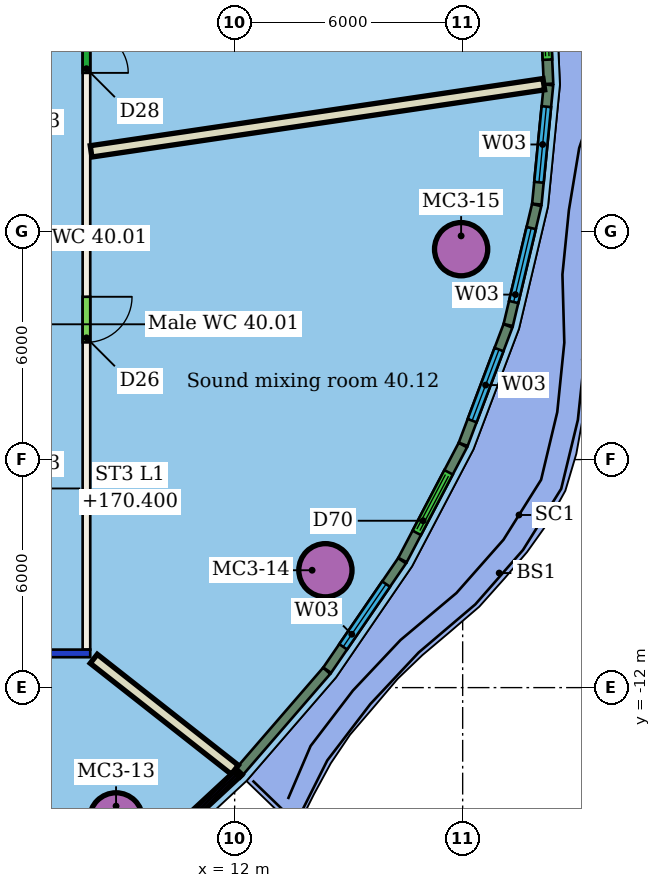
"""IFC4 building model, lengths in metres.
Left out: names, types, materials, properties, quantities, classifications, styles, units other than length and angle.
Written with IfcOpenShell. Run it as: python <this file> out.ifc"""

import sys

from ifc_helpers import new_model, si_unit, direction, frame, frame_2d, origin, origin_2d, place, context, subcontext, project, spatial, rectangle, hollow_circle, extrude, element, fill, save


model = new_model("IFC4")
c1 = context("Model", 3, precision=1e-05, world=origin(), true_north=direction((0.0, 1.0)))
c2 = subcontext(c1, "Body", "Model", "MODEL_VIEW")
j1 = project(units=[si_unit("LENGTHUNIT", "METRE"), si_unit("PLANEANGLEUNIT", "RADIAN")], contexts=[c1])
p1 = place(None, origin())
s1 = spatial("IfcSite", under=j1, at=p1, CompositionType="ELEMENT")
p2 = place(p1, origin())
s2 = spatial("IfcBuilding", under=s1, at=p2, CompositionType="ELEMENT")
p3 = place(p2, frame((0.0, 0.0, 168.6)))
s3 = spatial("IfcBuildingStorey", under=s2, at=p3, CompositionType="ELEMENT", Elevation=168.6)
for number, where, z_axis, x_axis in (
    (1, (8.879, -15.467, 0.0), (0.0, 0.0, 1.0), (1.0, 0.0, 0.0)),
    (2, (14.388, -8.912, 0.0), (0.0, 0.0, 1.0), (1.0, 0.0, 0.0)),
    (3, (17.959, -0.464, 0.0), (0.0, 0.0, 1.0), (1.0, 0.0, 0.0)),
):
    element("IfcColumn", number, at=place(p3, frame(where, z_axis=z_axis, x_axis=x_axis)), inside=s3, PredefinedType="COLUMN", context=c2, shape_type="SweptSolid", body=[
        extrude(hollow_circle(Radius=0.7, WallThickness=0.05, at=origin_2d()), origin(), (0.0, 0.0, 1.0), 3.45),
    ])
p4 = place(p3, frame((8.2, -11.1, 0.0), z_axis=(0.0, 0.0, 1.0), x_axis=(-1.0, 0.0, 0.0)))
e4 = element("IfcWall", 4, at=p4, inside=s3, PredefinedType="PARTITIONING", context=c2, shape_type="SweptSolid", body=[
    extrude(rectangle(XDim=28.4, YDim=0.2, at=frame_2d((14.2, 0.0))), origin(), (0.0, 0.0, 1.0), 3.05),
])
p5 = place(p4, frame((24.377, 0.0, 0.0)))
e5 = element("IfcOpeningElement", 5, at=p5, cuts=e4, PredefinedType="OPENING", context=c2, shape_type="SweptSolid", body=[
    extrude(rectangle(XDim=1.2, YDim=2.1, at=frame_2d((0.6, 1.05))), frame((0.0, 0.11, 0.0), z_axis=(0.0, -1.0, 0.0), x_axis=(1.0, 0.0, 0.0)), (0.0, 0.0, 1.0), 0.22),
])
p6 = place(p4, frame((19.08, 0.0, 0.0)))
e6 = element("IfcOpeningElement", 6, at=p6, cuts=e4, PredefinedType="OPENING", context=c2, shape_type="SweptSolid", body=[
    extrude(rectangle(XDim=1.2, YDim=2.1, at=frame_2d((0.6, 1.05))), frame((0.0, 0.11, 0.0), z_axis=(0.0, -1.0, 0.0), x_axis=(1.0, 0.0, 0.0)), (0.0, 0.0, 1.0), 0.22),
])
p7 = place(p4, frame((14.784, 0.0, 0.0)))
e7 = element("IfcOpeningElement", 7, at=p7, cuts=e4, PredefinedType="OPENING", context=c2, shape_type="SweptSolid", body=[
    extrude(rectangle(XDim=1.8, YDim=2.4, at=frame_2d((0.9, 1.2))), frame((0.0, 0.11, 0.0), z_axis=(0.0, -1.0, 0.0), x_axis=(1.0, 0.0, 0.0)), (0.0, 0.0, 1.0), 0.22),
])
p8 = place(p4, frame((8.35, 0.0, 0.0)))
e8 = element("IfcOpeningElement", 8, at=p8, cuts=e4, PredefinedType="OPENING", context=c2, shape_type="SweptSolid", body=[
    extrude(rectangle(XDim=1.5, YDim=2.1, at=frame_2d((0.75, 1.05))), frame((0.0, 0.11, 0.0), z_axis=(0.0, -1.0, 0.0), x_axis=(1.0, 0.0, 0.0)), (0.0, 0.0, 1.0), 0.22),
])
p9 = place(p4, frame((3.691, 0.0, 0.0)))
e9 = element("IfcOpeningElement", 9, at=p9, cuts=e4, PredefinedType="OPENING", context=c2, shape_type="SweptSolid", body=[
    extrude(rectangle(XDim=1.2, YDim=2.1, at=frame_2d((0.6, 1.05))), frame((0.0, 0.11, 0.0), z_axis=(0.0, -1.0, 0.0), x_axis=(1.0, 0.0, 0.0)), (0.0, 0.0, 1.0), 0.22),
])
p10 = place(p3, frame((8.1, 11.0, 0.0), z_axis=(0.0, 0.0, 1.0), x_axis=(0.0, -1.0, 0.0)))
e10 = element("IfcWall", 10, at=p10, inside=s3, PredefinedType="PARTITIONING", context=c2, shape_type="SweptSolid", body=[
    extrude(rectangle(XDim=22.0, YDim=0.2, at=frame_2d((11.0, 0.0))), origin(), (0.0, 0.0, 1.0), 3.45),
])
p11 = place(p10, frame((12.716, 0.0, 0.0)))
e11 = element("IfcOpeningElement", 11, at=p11, cuts=e10, PredefinedType="OPENING", context=c2, shape_type="SweptSolid", body=[
    extrude(rectangle(XDim=1.2, YDim=2.1, at=frame_2d((0.6, 1.05))), frame((0.0, 0.11, 0.0), z_axis=(0.0, -1.0, 0.0), x_axis=(1.0, 0.0, 0.0)), (0.0, 0.0, 1.0), 0.22),
])
p12 = place(p10, frame((5.725, 0.0, 0.0)))
e12 = element("IfcOpeningElement", 12, at=p12, cuts=e10, PredefinedType="OPENING", context=c2, shape_type="SweptSolid", body=[
    extrude(rectangle(XDim=1.1, YDim=2.1, at=frame_2d((0.55, 1.05))), frame((0.0, 0.11, 0.0), z_axis=(0.0, -1.0, 0.0), x_axis=(1.0, 0.0, 0.0)), (0.0, 0.0, 1.0), 0.22),
])
p13 = place(p3, frame((12.005, -14.162, 0.0), z_axis=(0.0, 0.0, 1.0), x_axis=(-0.785991742752, 0.618236993657, 0.0)))
e13 = element("IfcWall", 13, at=p13, inside=s3, PredefinedType="PARTITIONING", context=c2, shape_type="SweptSolid", body=[
    extrude(rectangle(XDim=4.723, YDim=0.3, at=frame_2d((2.361, 0.0))), origin(), (0.0, 0.0, 1.0), 3.45),
])
p14 = place(p3, frame((20.135, 3.877, 0.0), z_axis=(0.0, 0.0, 1.0), x_axis=(-0.989174164401, -0.146746286091, 0.0)))
e14 = element("IfcWall", 14, at=p14, inside=s3, PredefinedType="PARTITIONING", context=c2, shape_type="SweptSolid", body=[
    extrude(rectangle(XDim=12.043, YDim=0.3, at=frame_2d((6.022, 0.0))), origin(), (0.0, 0.0, 1.0), 3.45),
])
p15 = place(p3, frame((12.131, -14.207, 0.0), z_axis=(0.0, 0.0, 1.0), x_axis=(0.654160555631, 0.756355714897, 0.0)))
e15 = element("IfcWall", 15, at=p15, inside=s3, PredefinedType="SOLIDWALL", context=c2, shape_type="SweptSolid", body=[
    extrude(rectangle(XDim=3.502, YDim=0.25, at=frame_2d((1.751, 0.0))), origin(), (0.0, 0.0, 1.0), 3.1),
])
p16 = place(p3, frame((14.435, -11.54, 0.0), z_axis=(0.0, 0.0, 1.0), x_axis=(0.564914738845, 0.825149282152, 0.0)))
e16 = element("IfcWall", 16, at=p16, inside=s3, PredefinedType="SOLIDWALL", context=c2, shape_type="SweptSolid", body=[
    extrude(rectangle(XDim=3.488, YDim=0.25, at=frame_2d((1.744, 0.0))), origin(), (0.0, 0.0, 1.0), 3.1),
])
p17 = place(p16, frame((0.744, 0.0, 0.9)))
e17 = element("IfcOpeningElement", 17, at=p17, cuts=e16, PredefinedType="OPENING", context=c2, shape_type="SweptSolid", body=[
    extrude(rectangle(XDim=2.0, YDim=2.1, at=frame_2d((1.0, 1.05))), frame((0.0, 0.135, 0.0), z_axis=(0.0, -1.0, 0.0), x_axis=(1.0, 0.0, 0.0)), (0.0, 0.0, 1.0), 0.27),
])
p18 = place(p3, frame((16.417, -8.643, 0.0), z_axis=(0.0, 0.0, 1.0), x_axis=(0.464826893602, 0.885401580631, 0.0)))
e18 = element("IfcWall", 18, at=p18, inside=s3, PredefinedType="SOLIDWALL", context=c2, shape_type="SweptSolid", body=[
    extrude(rectangle(XDim=3.415, YDim=0.25, at=frame_2d((1.708, 0.0))), origin(), (0.0, 0.0, 1.0), 3.1),
])
p19 = place(p18, frame((0.807, 0.0, 0.0)))
e19 = element("IfcOpeningElement", 19, at=p19, cuts=e18, PredefinedType="OPENING", context=c2, shape_type="SweptSolid", body=[
    extrude(rectangle(XDim=1.8, YDim=2.4, at=frame_2d((0.9, 1.2))), frame((0.0, 0.135, 0.0), z_axis=(0.0, -1.0, 0.0), x_axis=(1.0, 0.0, 0.0)), (0.0, 0.0, 1.0), 0.27),
])
p20 = place(p3, frame((18.014, -5.598, 0.0), z_axis=(0.0, 0.0, 1.0), x_axis=(0.353443321973, 0.935455941321, 0.0)))
e20 = element("IfcWall", 20, at=p20, inside=s3, PredefinedType="SOLIDWALL", context=c2, shape_type="SweptSolid", body=[
    extrude(rectangle(XDim=3.332, YDim=0.25, at=frame_2d((1.666, 0.0))), origin(), (0.0, 0.0, 1.0), 3.1),
])
p21 = place(p20, frame((0.666, 0.0, 0.9)))
e21 = element("IfcOpeningElement", 21, at=p21, cuts=e20, PredefinedType="OPENING", context=c2, shape_type="SweptSolid", body=[
    extrude(rectangle(XDim=2.0, YDim=2.1, at=frame_2d((1.0, 1.05))), frame((0.0, 0.135, 0.0), z_axis=(0.0, -1.0, 0.0), x_axis=(1.0, 0.0, 0.0)), (0.0, 0.0, 1.0), 0.27),
])
p22 = place(p3, frame((19.199, -2.458, 0.0), z_axis=(0.0, 0.0, 1.0), x_axis=(0.230755279109, 0.973011819642, 0.0)))
e22 = element("IfcWall", 22, at=p22, inside=s3, PredefinedType="SOLIDWALL", context=c2, shape_type="SweptSolid", body=[
    extrude(rectangle(XDim=3.243, YDim=0.25, at=frame_2d((1.621, 0.0))), origin(), (0.0, 0.0, 1.0), 3.1),
])
p23 = place(p22, frame((0.621, 0.0, 0.9)))
e23 = element("IfcOpeningElement", 23, at=p23, cuts=e22, PredefinedType="OPENING", context=c2, shape_type="SweptSolid", body=[
    extrude(rectangle(XDim=2.0, YDim=2.1, at=frame_2d((1.0, 1.05))), frame((0.0, 0.135, 0.0), z_axis=(0.0, -1.0, 0.0), x_axis=(1.0, 0.0, 0.0)), (0.0, 0.0, 1.0), 0.27),
])
p24 = place(p3, frame((19.951, 0.721, 0.0), z_axis=(0.0, 0.0, 1.0), x_axis=(0.097518814735, 0.99523368149, 0.0)))
e24 = element("IfcWall", 24, at=p24, inside=s3, PredefinedType="SOLIDWALL", context=c2, shape_type="SweptSolid", body=[
    extrude(rectangle(XDim=3.155, YDim=0.25, at=frame_2d((1.577, 0.0))), origin(), (0.0, 0.0, 1.0), 3.1),
])
p25 = place(p24, frame((0.577, 0.0, 0.9)))
e25 = element("IfcOpeningElement", 25, at=p25, cuts=e24, PredefinedType="OPENING", context=c2, shape_type="SweptSolid", body=[
    extrude(rectangle(XDim=2.0, YDim=2.1, at=frame_2d((1.0, 1.05))), frame((0.0, 0.135, 0.0), z_axis=(0.0, -1.0, 0.0), x_axis=(1.0, 0.0, 0.0)), (0.0, 0.0, 1.0), 0.27),
])
p26 = place(p3, frame((20.259, 3.887, 0.0), z_axis=(0.0, 0.0, 1.0), x_axis=(-0.044643739649, 0.999002971222, 0.0)))
e26 = element("IfcWall", 26, at=p26, inside=s3, PredefinedType="SOLIDWALL", context=c2, shape_type="SweptSolid", body=[
    extrude(rectangle(XDim=3.073, YDim=0.25, at=frame_2d((1.537, 0.0))), origin(), (0.0, 0.0, 1.0), 3.1),
])
p27 = place(p26, frame((0.637, 0.0, 0.0)))
e27 = element("IfcOpeningElement", 27, at=p27, cuts=e26, PredefinedType="OPENING", context=c2, shape_type="SweptSolid", body=[
    extrude(rectangle(XDim=1.8, YDim=2.4, at=frame_2d((0.9, 1.2))), frame((0.0, 0.135, 0.0), z_axis=(0.0, -1.0, 0.0), x_axis=(1.0, 0.0, 0.0)), (0.0, 0.0, 1.0), 0.27),
])
p28 = place(p11, origin())
e28 = element("IfcDoor", 28, at=p28, inside=s3, OperationType="SINGLE_SWING_LEFT", PredefinedType="DOOR", context=c2, shape_type="SweptSolid", body=[
    extrude(rectangle(XDim=1.2, YDim=2.1, at=frame_2d((0.6, 1.05))), frame((0.0, 0.025, 0.0), z_axis=(0.0, -1.0, 0.0), x_axis=(1.0, 0.0, 0.0)), (0.0, 0.0, 1.0), 0.05),
])
fill(e11, e28)
p29 = place(p12, origin())
e29 = element("IfcDoor", 29, at=p29, inside=s3, OperationType="SINGLE_SWING_RIGHT", PredefinedType="DOOR", context=c2, shape_type="SweptSolid", body=[
    extrude(rectangle(XDim=1.1, YDim=2.1, at=frame_2d((0.55, 1.05))), frame((0.0, 0.025, 0.0), z_axis=(0.0, -1.0, 0.0), x_axis=(1.0, 0.0, 0.0)), (0.0, 0.0, 1.0), 0.05),
])
fill(e12, e29)
p30 = place(p17, origin())
e30 = element("IfcWindow", 30, at=p30, inside=s3, PartitioningType="SINGLE_PANEL", PredefinedType="WINDOW", context=c2, shape_type="SweptSolid", body=[
    extrude(rectangle(XDim=2.0, YDim=2.1, at=frame_2d((1.0, 1.05))), frame((0.0, 0.03, 0.0), z_axis=(0.0, -1.0, 0.0), x_axis=(1.0, 0.0, 0.0)), (0.0, 0.0, 1.0), 0.06),
])
fill(e17, e30)
p31 = place(p19, origin())
e31 = element("IfcDoor", 31, at=p31, inside=s3, OperationType="DOUBLE_DOOR_SLIDING", PredefinedType="DOOR", context=c2, shape_type="SweptSolid", body=[
    extrude(rectangle(XDim=1.8, YDim=2.4, at=frame_2d((0.9, 1.2))), frame((0.0, 0.025, 0.0), z_axis=(0.0, -1.0, 0.0), x_axis=(1.0, 0.0, 0.0)), (0.0, 0.0, 1.0), 0.05),
])
fill(e19, e31)
p32 = place(p21, origin())
e32 = element("IfcWindow", 32, at=p32, inside=s3, PartitioningType="SINGLE_PANEL", PredefinedType="WINDOW", context=c2, shape_type="SweptSolid", body=[
    extrude(rectangle(XDim=2.0, YDim=2.1, at=frame_2d((1.0, 1.05))), frame((0.0, 0.03, 0.0), z_axis=(0.0, -1.0, 0.0), x_axis=(1.0, 0.0, 0.0)), (0.0, 0.0, 1.0), 0.06),
])
fill(e21, e32)
p33 = place(p23, origin())
e33 = element("IfcWindow", 33, at=p33, inside=s3, PartitioningType="SINGLE_PANEL", PredefinedType="WINDOW", context=c2, shape_type="SweptSolid", body=[
    extrude(rectangle(XDim=2.0, YDim=2.1, at=frame_2d((1.0, 1.05))), frame((0.0, 0.03, 0.0), z_axis=(0.0, -1.0, 0.0), x_axis=(1.0, 0.0, 0.0)), (0.0, 0.0, 1.0), 0.06),
])
fill(e23, e33)
p34 = place(p25, origin())
e34 = element("IfcWindow", 34, at=p34, inside=s3, PartitioningType="SINGLE_PANEL", PredefinedType="WINDOW", context=c2, shape_type="SweptSolid", body=[
    extrude(rectangle(XDim=2.0, YDim=2.1, at=frame_2d((1.0, 1.05))), frame((0.0, 0.03, 0.0), z_axis=(0.0, -1.0, 0.0), x_axis=(1.0, 0.0, 0.0)), (0.0, 0.0, 1.0), 0.06),
])
fill(e25, e34)
p35 = place(p27, origin())
e35 = element("IfcDoor", 35, at=p35, inside=s3, OperationType="DOUBLE_DOOR_SLIDING", PredefinedType="DOOR", context=c2, shape_type="SweptSolid", body=[
    extrude(rectangle(XDim=1.8, YDim=2.4, at=frame_2d((0.9, 1.2))), frame((0.0, 0.025, 0.0), z_axis=(0.0, -1.0, 0.0), x_axis=(1.0, 0.0, 0.0)), (0.0, 0.0, 1.0), 0.05),
])
fill(e27, e35)
save(model, sys.argv[1])
